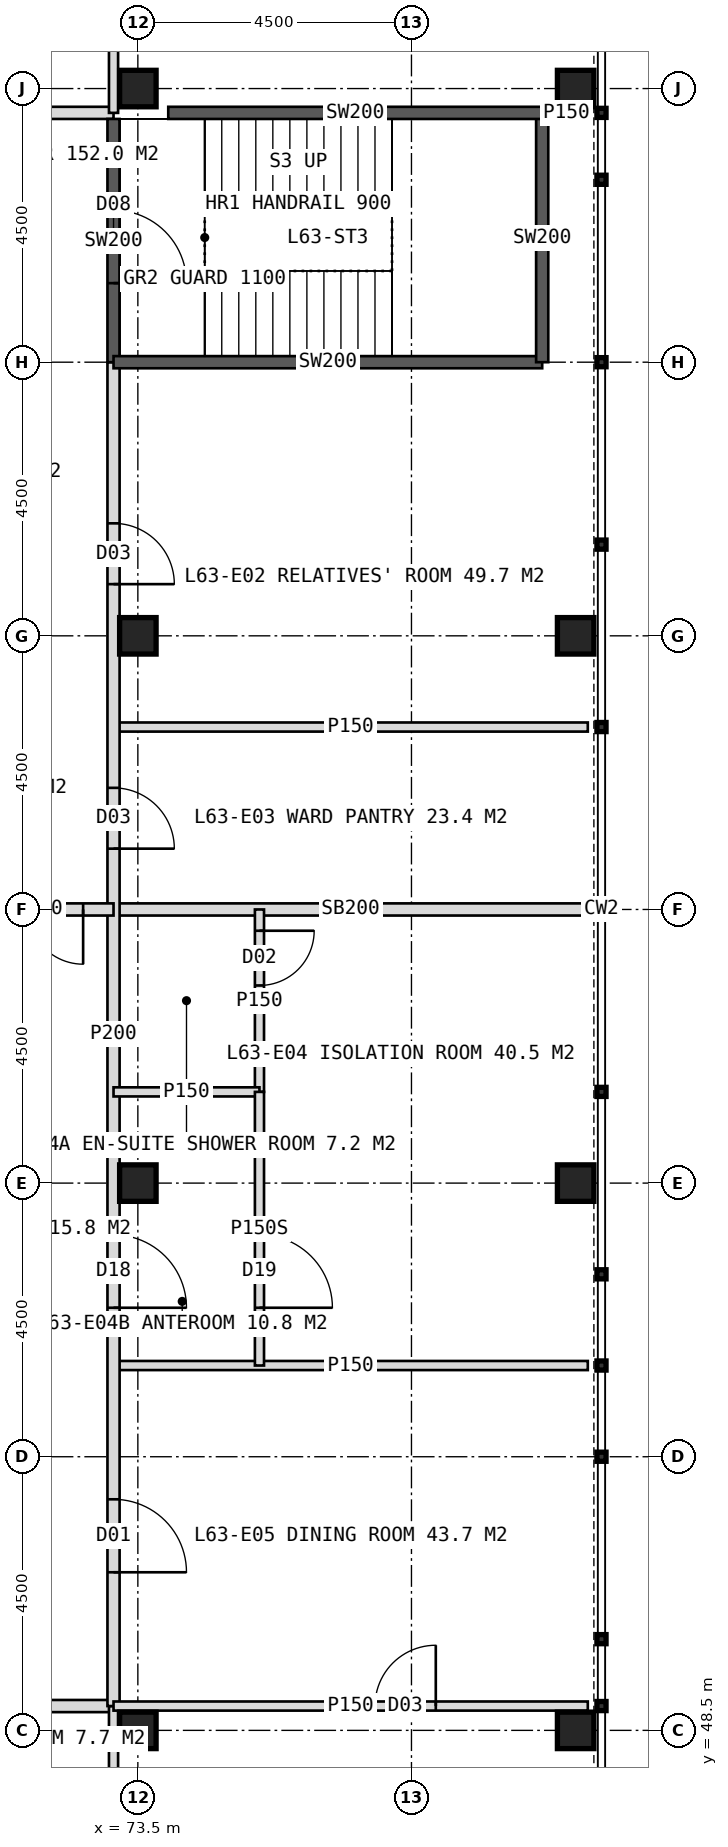
"""IFC4 building model, lengths in metres.
Left out: names, types, materials, properties, quantities, classifications, styles, units other than length and angle.
Written with IfcOpenShell. Run it as: python <this file> out.ifc"""

import sys

from ifc_helpers import new_model, si_unit, direction, frame, frame_2d, origin, origin_2d, place, context, subcontext, project, spatial, rectangle, hollow_rectangle, extrude, element, fill, save


model = new_model("IFC4")
c1 = context("Model", 3, precision=1e-05, world=origin(), true_north=direction((0.0, 1.0)))
c2 = subcontext(c1, "Body", "Model", "MODEL_VIEW")
j1 = project(units=[si_unit("LENGTHUNIT", "METRE"), si_unit("PLANEANGLEUNIT", "RADIAN")], contexts=[c1])
p1 = place(None, origin())
s1 = spatial("IfcSite", under=j1, at=p1, CompositionType="ELEMENT")
p2 = place(p1, origin())
s2 = spatial("IfcBuilding", under=s1, at=p2, CompositionType="ELEMENT")
p3 = place(p2, frame((0.0, 0.0, 262.0)))
s3 = spatial("IfcBuildingStorey", under=s2, at=p3, CompositionType="ELEMENT", Elevation=262.0)
for number, where, z_axis, x_axis in (
    (1, (73.5, 48.5, 0.0), (0.0, 0.0, 1.0), (1.0, 0.0, 0.0)),
    (2, (73.5, 75.5, 0.0), (0.0, 0.0, 1.0), (1.0, 0.0, 0.0)),
    (3, (73.5, 57.5, 0.0), (0.0, 0.0, 1.0), (1.0, 0.0, 0.0)),
    (4, (73.5, 66.5, 0.0), (0.0, 0.0, 1.0), (1.0, 0.0, 0.0)),
    (5, (80.7, 48.5, 0.0), (0.0, 0.0, 1.0), (1.0, 0.0, 0.0)),
    (6, (80.7, 57.5, 0.0), (0.0, 0.0, 1.0), (1.0, 0.0, 0.0)),
    (7, (80.7, 66.5, 0.0), (0.0, 0.0, 1.0), (1.0, 0.0, 0.0)),
    (8, (80.7, 75.5, 0.0), (0.0, 0.0, 1.0), (1.0, 0.0, 0.0)),
):
    element("IfcColumn", number, at=place(p3, frame(where, z_axis=z_axis, x_axis=x_axis)), inside=s3, PredefinedType="COLUMN", context=c2, shape_type="SweptSolid", body=[
        extrude(hollow_rectangle(XDim=0.6, YDim=0.6, WallThickness=0.04, at=origin_2d()), origin(), (0.0, 0.0, 1.0), 4.0),
    ])
p4 = place(p3, frame((46.9, 75.1, 0.0), z_axis=(0.0, 0.0, 1.0), x_axis=(1.0, 0.0, 0.0)))
e9 = element("IfcWall", 9, at=p4, inside=s3, PredefinedType="PARTITIONING", context=c2, shape_type="SweptSolid", body=[
    extrude(rectangle(XDim=26.2, YDim=0.2, at=frame_2d((13.1, 0.0))), origin(), (0.0, 0.0, 1.0), 3.75),
])
p5 = place(p4, frame((1.55, 0.0, 0.0)))
e10 = element("IfcOpeningElement", 10, at=p5, cuts=e9, PredefinedType="OPENING", context=c2, shape_type="SweptSolid", body=[
    extrude(rectangle(XDim=1.0, YDim=2.1, at=frame_2d((0.5, 1.05))), frame((0.0, 0.11, 0.0), z_axis=(0.0, -1.0, 0.0), x_axis=(1.0, 0.0, 0.0)), (0.0, 0.0, 1.0), 0.22),
])
p6 = place(p4, frame((6.6, 0.0, 0.0)))
e11 = element("IfcOpeningElement", 11, at=p6, cuts=e9, PredefinedType="OPENING", context=c2, shape_type="SweptSolid", body=[
    extrude(rectangle(XDim=1.0, YDim=2.1, at=frame_2d((0.5, 1.05))), frame((0.0, 0.11, 0.0), z_axis=(0.0, -1.0, 0.0), x_axis=(1.0, 0.0, 0.0)), (0.0, 0.0, 1.0), 0.22),
])
p7 = place(p4, frame((12.75, 0.0, 0.0)))
e12 = element("IfcOpeningElement", 12, at=p7, cuts=e9, PredefinedType="OPENING", context=c2, shape_type="SweptSolid", body=[
    extrude(rectangle(XDim=1.2, YDim=2.2, at=frame_2d((0.6, 1.1))), frame((0.0, 0.11, 0.0), z_axis=(0.0, -1.0, 0.0), x_axis=(1.0, 0.0, 0.0)), (0.0, 0.0, 1.0), 0.22),
])
p8 = place(p4, frame((18.45, 0.0, 0.0)))
e13 = element("IfcOpeningElement", 13, at=p8, cuts=e9, PredefinedType="OPENING", context=c2, shape_type="SweptSolid", body=[
    extrude(rectangle(XDim=1.0, YDim=2.1, at=frame_2d((0.5, 1.05))), frame((0.0, 0.11, 0.0), z_axis=(0.0, -1.0, 0.0), x_axis=(1.0, 0.0, 0.0)), (0.0, 0.0, 1.0), 0.22),
])
p9 = place(p4, frame((22.9, 0.0, 0.0)))
e14 = element("IfcOpeningElement", 14, at=p9, cuts=e9, PredefinedType="OPENING", context=c2, shape_type="SweptSolid", body=[
    extrude(rectangle(XDim=1.0, YDim=2.1, at=frame_2d((0.5, 1.05))), frame((0.0, 0.11, 0.0), z_axis=(0.0, -1.0, 0.0), x_axis=(1.0, 0.0, 0.0)), (0.0, 0.0, 1.0), 0.22),
])
p10 = place(p3, frame((73.1, 75.1, 0.0), z_axis=(0.0, 0.0, 1.0), x_axis=(0.0, 1.0, 0.0)))
e15 = element("IfcWall", 15, at=p10, inside=s3, PredefinedType="PARTITIONING", context=c2, shape_type="SweptSolid", body=[
    extrude(rectangle(XDim=7.8, YDim=0.15, at=frame_2d((3.9, 0.0))), origin(), (0.0, 0.0, 1.0), 3.75),
])
p11 = place(p10, frame((4.3, 0.0, 0.0)))
e16 = element("IfcOpeningElement", 16, at=p11, cuts=e15, PredefinedType="OPENING", context=c2, shape_type="SweptSolid", body=[
    extrude(rectangle(XDim=1.0, YDim=2.1, at=frame_2d((0.5, 1.05))), frame((0.0, 0.085, 0.0), z_axis=(0.0, -1.0, 0.0), x_axis=(1.0, 0.0, 0.0)), (0.0, 0.0, 1.0), 0.17),
])
p12 = place(p3, frame((73.1, 48.9, 0.0), z_axis=(0.0, 0.0, 1.0), x_axis=(-1.0, 0.0, 0.0)))
e17 = element("IfcWall", 17, at=p12, inside=s3, PredefinedType="PARTITIONING", context=c2, shape_type="SweptSolid", body=[
    extrude(rectangle(XDim=26.2, YDim=0.2, at=frame_2d((13.1, 0.0))), origin(), (0.0, 0.0, 1.0), 3.75),
])
p13 = place(p12, frame((1.75, 0.0, 0.0)))
e18 = element("IfcOpeningElement", 18, at=p13, cuts=e17, PredefinedType="OPENING", context=c2, shape_type="SweptSolid", body=[
    extrude(rectangle(XDim=1.2, YDim=2.2, at=frame_2d((0.6, 1.1))), frame((0.0, 0.11, 0.0), z_axis=(0.0, -1.0, 0.0), x_axis=(1.0, 0.0, 0.0)), (0.0, 0.0, 1.0), 0.22),
])
p14 = place(p12, frame((6.75, 0.0, 0.0)))
e19 = element("IfcOpeningElement", 19, at=p14, cuts=e17, PredefinedType="OPENING", context=c2, shape_type="SweptSolid", body=[
    extrude(rectangle(XDim=1.0, YDim=2.1, at=frame_2d((0.5, 1.05))), frame((0.0, 0.11, 0.0), z_axis=(0.0, -1.0, 0.0), x_axis=(1.0, 0.0, 0.0)), (0.0, 0.0, 1.0), 0.22),
])
p15 = place(p12, frame((14.25, 0.0, 0.0)))
e20 = element("IfcOpeningElement", 20, at=p15, cuts=e17, PredefinedType="OPENING", context=c2, shape_type="SweptSolid", body=[
    extrude(rectangle(XDim=1.2, YDim=2.2, at=frame_2d((0.6, 1.1))), frame((0.0, 0.11, 0.0), z_axis=(0.0, -1.0, 0.0), x_axis=(1.0, 0.0, 0.0)), (0.0, 0.0, 1.0), 0.22),
])
p16 = place(p12, frame((20.45, 0.0, 0.0)))
e21 = element("IfcOpeningElement", 21, at=p16, cuts=e17, PredefinedType="OPENING", context=c2, shape_type="SweptSolid", body=[
    extrude(rectangle(XDim=0.9, YDim=2.1, at=frame_2d((0.45, 1.05))), frame((0.0, 0.11, 0.0), z_axis=(0.0, -1.0, 0.0), x_axis=(1.0, 0.0, 0.0)), (0.0, 0.0, 1.0), 0.22),
])
p17 = place(p12, frame((18.45, 0.0, 0.0)))
e22 = element("IfcOpeningElement", 22, at=p17, cuts=e17, PredefinedType="OPENING", context=c2, shape_type="SweptSolid", body=[
    extrude(rectangle(XDim=1.0, YDim=2.1, at=frame_2d((0.5, 1.05))), frame((0.0, 0.11, 0.0), z_axis=(0.0, -1.0, 0.0), x_axis=(1.0, 0.0, 0.0)), (0.0, 0.0, 1.0), 0.22),
])
p18 = place(p12, frame((23.65, 0.0, 0.0)))
e23 = element("IfcOpeningElement", 23, at=p18, cuts=e17, PredefinedType="OPENING", context=c2, shape_type="SweptSolid", body=[
    extrude(rectangle(XDim=1.0, YDim=2.1, at=frame_2d((0.5, 1.05))), frame((0.0, 0.11, 0.0), z_axis=(0.0, -1.0, 0.0), x_axis=(1.0, 0.0, 0.0)), (0.0, 0.0, 1.0), 0.22),
])
for number, where, z_axis, x_axis in (
    (24, (73.1, 48.9, 0.0), (0.0, 0.0, 1.0), (0.0, -1.0, 0.0)),
    (25, (73.1, 65.0, 0.0), (0.0, 0.0, 1.0), (1.0, 0.0, 0.0)),
):
    element("IfcWall", number, at=place(p3, frame(where, z_axis=z_axis, x_axis=x_axis)), inside=s3, PredefinedType="PARTITIONING", context=c2, shape_type="SweptSolid", body=[
        extrude(rectangle(XDim=7.8, YDim=0.15, at=frame_2d((3.9, 0.0))), origin(), (0.0, 0.0, 1.0), 3.75),
    ])
p19 = place(p3, frame((73.1, 62.0, 0.0), z_axis=(0.0, 0.0, 1.0), x_axis=(1.0, 0.0, 0.0)))
e26 = element("IfcWall", 26, at=p19, inside=s3, PredefinedType="SOLIDWALL", context=c2, shape_type="SweptSolid", body=[
    extrude(rectangle(XDim=7.8, YDim=0.2, at=frame_2d((3.9, 0.0))), origin(), (0.0, 0.0, 1.0), 2.75),
])
p20 = place(p3, frame((73.1, 54.5, 0.0), z_axis=(0.0, 0.0, 1.0), x_axis=(1.0, 0.0, 0.0)))
e27 = element("IfcWall", 27, at=p20, inside=s3, PredefinedType="PARTITIONING", context=c2, shape_type="SweptSolid", body=[
    extrude(rectangle(XDim=7.8, YDim=0.15, at=frame_2d((3.9, 0.0))), origin(), (0.0, 0.0, 1.0), 3.75),
])
p21 = place(p3, frame((73.1, 71.0, 0.0), z_axis=(0.0, 0.0, 1.0), x_axis=(0.0, -1.0, 0.0)))
e28 = element("IfcWall", 28, at=p21, inside=s3, PredefinedType="PARTITIONING", context=c2, shape_type="SweptSolid", body=[
    extrude(rectangle(XDim=22.1, YDim=0.2, at=frame_2d((11.05, 0.0))), origin(), (0.0, 0.0, 1.0), 3.75),
])
p22 = place(p21, frame((2.65, 0.0, 0.0)))
e29 = element("IfcOpeningElement", 29, at=p22, cuts=e28, PredefinedType="OPENING", context=c2, shape_type="SweptSolid", body=[
    extrude(rectangle(XDim=1.0, YDim=2.1, at=frame_2d((0.5, 1.05))), frame((0.0, 0.11, 0.0), z_axis=(0.0, -1.0, 0.0), x_axis=(1.0, 0.0, 0.0)), (0.0, 0.0, 1.0), 0.22),
])
p23 = place(p21, frame((7.0, 0.0, 0.0)))
e30 = element("IfcOpeningElement", 30, at=p23, cuts=e28, PredefinedType="OPENING", context=c2, shape_type="SweptSolid", body=[
    extrude(rectangle(XDim=1.0, YDim=2.1, at=frame_2d((0.5, 1.05))), frame((0.0, 0.11, 0.0), z_axis=(0.0, -1.0, 0.0), x_axis=(1.0, 0.0, 0.0)), (0.0, 0.0, 1.0), 0.22),
])
p24 = place(p21, frame((14.35, 0.0, 0.0)))
e31 = element("IfcOpeningElement", 31, at=p24, cuts=e28, PredefinedType="OPENING", context=c2, shape_type="SweptSolid", body=[
    extrude(rectangle(XDim=1.2, YDim=2.2, at=frame_2d((0.6, 1.1))), frame((0.0, 0.11, 0.0), z_axis=(0.0, -1.0, 0.0), x_axis=(1.0, 0.0, 0.0)), (0.0, 0.0, 1.0), 0.22),
])
p25 = place(p21, frame((18.7, 0.0, 0.0)))
e32 = element("IfcOpeningElement", 32, at=p25, cuts=e28, PredefinedType="OPENING", context=c2, shape_type="SweptSolid", body=[
    extrude(rectangle(XDim=1.2, YDim=2.2, at=frame_2d((0.6, 1.1))), frame((0.0, 0.11, 0.0), z_axis=(0.0, -1.0, 0.0), x_axis=(1.0, 0.0, 0.0)), (0.0, 0.0, 1.0), 0.22),
])
p26 = place(p3, frame((80.2, 75.1, 0.0), z_axis=(0.0, 0.0, 1.0), x_axis=(1.0, 0.0, 0.0)))
e33 = element("IfcWall", 33, at=p26, inside=s3, PredefinedType="PARTITIONING", context=c2, shape_type="SweptSolid", body=[
    extrude(rectangle(XDim=0.7, YDim=0.15, at=frame_2d((0.35, 0.0))), origin(), (0.0, 0.0, 1.0), 3.75),
])
p27 = place(p3, frame((75.5, 62.0, 0.0), z_axis=(0.0, 0.0, 1.0), x_axis=(0.0, -1.0, 0.0)))
e34 = element("IfcWall", 34, at=p27, inside=s3, PredefinedType="PARTITIONING", context=c2, shape_type="SweptSolid", body=[
    extrude(rectangle(XDim=3.0, YDim=0.15, at=frame_2d((1.5, 0.0))), origin(), (0.0, 0.0, 1.0), 3.75),
])
p28 = place(p27, frame((0.35, 0.0, 0.0)))
e35 = element("IfcOpeningElement", 35, at=p28, cuts=e34, PredefinedType="OPENING", context=c2, shape_type="SweptSolid", body=[
    extrude(rectangle(XDim=0.9, YDim=2.1, at=frame_2d((0.45, 1.05))), frame((0.0, 0.085, 0.0), z_axis=(0.0, -1.0, 0.0), x_axis=(1.0, 0.0, 0.0)), (0.0, 0.0, 1.0), 0.17),
])
p29 = place(p3, frame((73.1, 59.0, 0.0), z_axis=(0.0, 0.0, 1.0), x_axis=(1.0, 0.0, 0.0)))
e36 = element("IfcWall", 36, at=p29, inside=s3, PredefinedType="PARTITIONING", context=c2, shape_type="SweptSolid", body=[
    extrude(rectangle(XDim=2.4, YDim=0.15, at=frame_2d((1.2, 0.0))), origin(), (0.0, 0.0, 1.0), 3.75),
])
p30 = place(p3, frame((75.5, 59.0, 0.0), z_axis=(0.0, 0.0, 1.0), x_axis=(0.0, -1.0, 0.0)))
e37 = element("IfcWall", 37, at=p30, inside=s3, PredefinedType="PARTITIONING", context=c2, shape_type="SweptSolid", body=[
    extrude(rectangle(XDim=4.5, YDim=0.15, at=frame_2d((2.25, 0.0))), origin(), (0.0, 0.0, 1.0), 3.75),
])
p31 = place(p30, frame((2.35, 0.0, 0.0)))
e38 = element("IfcOpeningElement", 38, at=p31, cuts=e37, PredefinedType="OPENING", context=c2, shape_type="SweptSolid", body=[
    extrude(rectangle(XDim=1.2, YDim=2.2, at=frame_2d((0.6, 1.1))), frame((0.0, 0.085, 0.0), z_axis=(0.0, -1.0, 0.0), x_axis=(1.0, 0.0, 0.0)), (0.0, 0.0, 1.0), 0.17),
])
p32 = place(p3, frame((73.1, 48.9, 0.0), z_axis=(0.0, 0.0, 1.0), x_axis=(1.0, 0.0, 0.0)))
e39 = element("IfcWall", 39, at=p32, inside=s3, PredefinedType="PARTITIONING", context=c2, shape_type="SweptSolid", body=[
    extrude(rectangle(XDim=7.8, YDim=0.15, at=frame_2d((3.9, 0.0))), origin(), (0.0, 0.0, 1.0), 3.75),
])
p33 = place(p32, frame((4.3, 0.0, 0.0)))
e40 = element("IfcOpeningElement", 40, at=p33, cuts=e39, PredefinedType="OPENING", context=c2, shape_type="SweptSolid", body=[
    extrude(rectangle(XDim=1.0, YDim=2.1, at=frame_2d((0.5, 1.05))), frame((0.0, 0.085, 0.0), z_axis=(0.0, -1.0, 0.0), x_axis=(1.0, 0.0, 0.0)), (0.0, 0.0, 1.0), 0.17),
])
p34 = place(p3, frame((70.5, 62.0, 0.0), z_axis=(0.0, 0.0, 1.0), x_axis=(1.0, 0.0, 0.0)))
e41 = element("IfcWall", 41, at=p34, inside=s3, PredefinedType="SOLIDWALL", context=c2, shape_type="SweptSolid", body=[
    extrude(rectangle(XDim=2.6, YDim=0.2, at=frame_2d((1.3, 0.0))), origin(), (0.0, 0.0, 1.0), 2.75),
])
p35 = place(p34, frame((0.3, 0.0, 0.0)))
e42 = element("IfcOpeningElement", 42, at=p35, cuts=e41, PredefinedType="OPENING", context=c2, shape_type="SweptSolid", body=[
    extrude(rectangle(XDim=1.8, YDim=2.2, at=frame_2d((0.9, 1.1))), frame((0.0, 0.11, 0.0), z_axis=(0.0, -1.0, 0.0), x_axis=(1.0, 0.0, 0.0)), (0.0, 0.0, 1.0), 0.22),
])
p36 = place(p3, frame((73.1, 75.0, 0.0), z_axis=(0.0, 0.0, 1.0), x_axis=(0.0, -1.0, 0.0)))
e43 = element("IfcWall", 43, at=p36, inside=s3, PredefinedType="SOLIDWALL", context=c2, shape_type="SweptSolid", body=[
    extrude(rectangle(XDim=4.0, YDim=0.2, at=frame_2d((2.0, 0.0))), origin(), (0.0, 0.0, 1.0), 3.75),
])
p37 = place(p36, frame((1.5, 0.0, 0.0)))
e44 = element("IfcOpeningElement", 44, at=p37, cuts=e43, PredefinedType="OPENING", context=c2, shape_type="SweptSolid", body=[
    extrude(rectangle(XDim=1.2, YDim=2.1, at=frame_2d((0.6, 1.05))), frame((0.0, 0.11, 0.0), z_axis=(0.0, -1.0, 0.0), x_axis=(1.0, 0.0, 0.0)), (0.0, 0.0, 1.0), 0.22),
])
p38 = place(p3, frame((73.1, 71.0, 0.0), z_axis=(0.0, 0.0, 1.0), x_axis=(1.0, 0.0, 0.0)))
e45 = element("IfcWall", 45, at=p38, inside=s3, PredefinedType="SOLIDWALL", context=c2, shape_type="SweptSolid", body=[
    extrude(rectangle(XDim=7.05, YDim=0.2, at=frame_2d((3.525, 0.0))), origin(), (0.0, 0.0, 1.0), 3.75),
])
p39 = place(p3, frame((80.15, 71.0, 0.0), z_axis=(0.0, 0.0, 1.0), x_axis=(0.0, 1.0, 0.0)))
e46 = element("IfcWall", 46, at=p39, inside=s3, PredefinedType="SOLIDWALL", context=c2, shape_type="SweptSolid", body=[
    extrude(rectangle(XDim=4.1, YDim=0.2, at=frame_2d((2.05, 0.0))), origin(), (0.0, 0.0, 1.0), 3.75),
])
p40 = place(p3, frame((74.0, 75.1, 0.0), z_axis=(0.0, 0.0, 1.0), x_axis=(1.0, 0.0, 0.0)))
e47 = element("IfcWall", 47, at=p40, inside=s3, PredefinedType="SOLIDWALL", context=c2, shape_type="SweptSolid", body=[
    extrude(rectangle(XDim=6.15, YDim=0.2, at=frame_2d((3.075, 0.0))), origin(), (0.0, 0.0, 1.0), 3.75),
])
p41 = place(p22, origin())
e48 = element("IfcDoor", 48, at=p41, inside=s3, OperationType="SINGLE_SWING_RIGHT", PredefinedType="DOOR", context=c2, shape_type="SweptSolid", body=[
    extrude(rectangle(XDim=1.0, YDim=2.1, at=frame_2d((0.5, 1.05))), frame((0.0, 0.025, 0.0), z_axis=(0.0, -1.0, 0.0), x_axis=(1.0, 0.0, 0.0)), (0.0, 0.0, 1.0), 0.05),
])
fill(e29, e48)
p42 = place(p23, origin())
e49 = element("IfcDoor", 49, at=p42, inside=s3, OperationType="SINGLE_SWING_RIGHT", PredefinedType="DOOR", context=c2, shape_type="SweptSolid", body=[
    extrude(rectangle(XDim=1.0, YDim=2.1, at=frame_2d((0.5, 1.05))), frame((0.0, 0.025, 0.0), z_axis=(0.0, -1.0, 0.0), x_axis=(1.0, 0.0, 0.0)), (0.0, 0.0, 1.0), 0.05),
])
fill(e30, e49)
p43 = place(p31, origin())
e50 = element("IfcDoor", 50, at=p43, inside=s3, OperationType="SINGLE_SWING_RIGHT", PredefinedType="DOOR", context=c2, shape_type="SweptSolid", body=[
    extrude(rectangle(XDim=1.2, YDim=2.2, at=frame_2d((0.6, 1.1))), frame((0.0, 0.025, 0.0), z_axis=(0.0, -1.0, 0.0), x_axis=(1.0, 0.0, 0.0)), (0.0, 0.0, 1.0), 0.05),
])
fill(e38, e50)
p44 = place(p24, origin())
e51 = element("IfcDoor", 51, at=p44, inside=s3, OperationType="SINGLE_SWING_RIGHT", PredefinedType="DOOR", context=c2, shape_type="SweptSolid", body=[
    extrude(rectangle(XDim=1.2, YDim=2.2, at=frame_2d((0.6, 1.1))), frame((0.0, 0.025, 0.0), z_axis=(0.0, -1.0, 0.0), x_axis=(1.0, 0.0, 0.0)), (0.0, 0.0, 1.0), 0.05),
])
fill(e31, e51)
p45 = place(p28, origin())
e52 = element("IfcDoor", 52, at=p45, inside=s3, OperationType="SINGLE_SWING_LEFT", PredefinedType="DOOR", context=c2, shape_type="SweptSolid", body=[
    extrude(rectangle(XDim=0.9, YDim=2.1, at=frame_2d((0.45, 1.05))), frame((0.0, 0.025, 0.0), z_axis=(0.0, -1.0, 0.0), x_axis=(1.0, 0.0, 0.0)), (0.0, 0.0, 1.0), 0.05),
])
fill(e35, e52)
p46 = place(p33, origin())
e53 = element("IfcDoor", 53, at=p46, inside=s3, OperationType="SINGLE_SWING_RIGHT", PredefinedType="DOOR", context=c2, shape_type="SweptSolid", body=[
    extrude(rectangle(XDim=1.0, YDim=2.1, at=frame_2d((0.5, 1.05))), frame((0.0, 0.025, 0.0), z_axis=(0.0, -1.0, 0.0), x_axis=(1.0, 0.0, 0.0)), (0.0, 0.0, 1.0), 0.05),
])
fill(e40, e53)
p47 = place(p25, origin())
e54 = element("IfcDoor", 54, at=p47, inside=s3, OperationType="SINGLE_SWING_RIGHT", PredefinedType="DOOR", context=c2, shape_type="SweptSolid", body=[
    extrude(rectangle(XDim=1.2, YDim=2.2, at=frame_2d((0.6, 1.1))), frame((0.0, 0.025, 0.0), z_axis=(0.0, -1.0, 0.0), x_axis=(1.0, 0.0, 0.0)), (0.0, 0.0, 1.0), 0.05),
])
fill(e32, e54)
p48 = place(p35, origin())
e55 = element("IfcDoor", 55, at=p48, inside=s3, OperationType="DOUBLE_DOOR_DOUBLE_SWING", PredefinedType="DOOR", context=c2, shape_type="SweptSolid", body=[
    extrude(rectangle(XDim=1.8, YDim=2.2, at=frame_2d((0.9, 1.1))), frame((0.0, 0.025, 0.0), z_axis=(0.0, -1.0, 0.0), x_axis=(1.0, 0.0, 0.0)), (0.0, 0.0, 1.0), 0.05),
])
fill(e42, e55)
p49 = place(p37, origin())
e56 = element("IfcDoor", 56, at=p49, inside=s3, OperationType="SINGLE_SWING_RIGHT", PredefinedType="DOOR", context=c2, shape_type="SweptSolid", body=[
    extrude(rectangle(XDim=1.2, YDim=2.1, at=frame_2d((0.6, 1.05))), frame((0.0, 0.025, 0.0), z_axis=(0.0, -1.0, 0.0), x_axis=(1.0, 0.0, 0.0)), (0.0, 0.0, 1.0), 0.05),
])
fill(e44, e56)
save(model, sys.argv[1])
